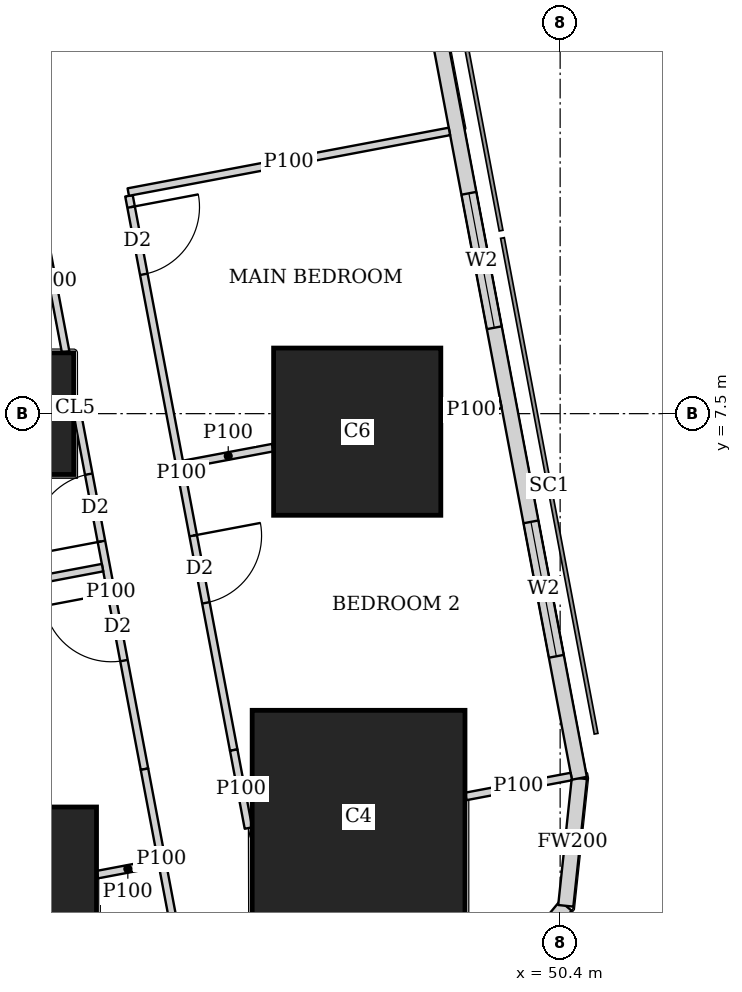
"""IFC4 building model, lengths in metres.
Left out: names, types, materials, properties, quantities, classifications, styles, units other than length and angle.
Written with IfcOpenShell. Run it as: python <this file> out.ifc"""

import sys

from ifc_helpers import new_model, si_unit, direction, frame, frame_2d, origin, origin_2d, place, context, subcontext, project, spatial, rectangle, extrude, element, fill, save


model = new_model("IFC4")
c1 = context("Model", 3, precision=1e-05, world=origin(), true_north=direction((0.0, 1.0)))
c2 = subcontext(c1, "Body", "Model", "MODEL_VIEW")
j1 = project(units=[si_unit("LENGTHUNIT", "METRE"), si_unit("PLANEANGLEUNIT", "RADIAN")], contexts=[c1])
p1 = place(None, origin())
s1 = spatial("IfcSite", under=j1, at=p1, CompositionType="ELEMENT")
p2 = place(p1, origin())
s2 = spatial("IfcBuilding", under=s1, at=p2, CompositionType="ELEMENT")
p3 = place(p2, frame((0.0, 0.0, 77.9)))
s3 = spatial("IfcBuildingStorey", under=s2, at=p3, CompositionType="ELEMENT", Elevation=77.9)
p4 = place(p3, frame((43.2, 1.225, 0.0), z_axis=(0.0, 0.0, 1.0), x_axis=(1.0, 0.0, 0.0)))
e1 = element("IfcColumn", 1, at=p4, inside=s3, PredefinedType="COLUMN", context=c2, shape_type="SweptSolid", body=[
    extrude(rectangle(XDim=2.2, YDim=2.2, at=origin_2d()), origin(), (0.0, 0.0, 1.0), 3.75),
])
p5 = place(p3, frame((47.748, 2.197, 0.0), z_axis=(0.0, 0.0, 1.0), x_axis=(1.0, 0.0, 0.0)))
e2 = element("IfcColumn", 2, at=p5, inside=s3, PredefinedType="COLUMN", context=c2, shape_type="SweptSolid", body=[
    extrude(rectangle(XDim=2.8, YDim=2.8, at=origin_2d()), origin(), (0.0, 0.0, 1.0), 3.75),
])
p6 = place(p3, frame((43.2, 7.5, 0.0), z_axis=(0.0, 0.0, 1.0), x_axis=(1.0, 0.0, 0.0)))
e3 = element("IfcColumn", 3, at=p6, inside=s3, PredefinedType="COLUMN", context=c2, shape_type="SweptSolid", body=[
    extrude(rectangle(XDim=1.6, YDim=1.6, at=origin_2d()), origin(), (0.0, 0.0, 1.0), 3.75),
])
p7 = place(p3, frame((47.73, 7.263, 0.0), z_axis=(0.0, 0.0, 1.0), x_axis=(1.0, 0.0, 0.0)))
e4 = element("IfcColumn", 4, at=p7, inside=s3, PredefinedType="COLUMN", context=c2, shape_type="SweptSolid", body=[
    extrude(rectangle(XDim=2.2, YDim=2.2, at=origin_2d()), origin(), (0.0, 0.0, 1.0), 3.75),
])
p8 = place(p3, frame((49.407, -0.263, 0.0), z_axis=(0.0, 0.0, 1.0), x_axis=(0.638042593423, 0.770001070764, 0.0)))
e5 = element("IfcWall", 5, at=p8, inside=s3, PredefinedType="SOLIDWALL", context=c2, shape_type="SweptSolid", body=[
    extrude(rectangle(XDim=1.673, YDim=0.2, at=frame_2d((0.836, 0.0))), origin(), (0.0, 0.0, 1.0), 3.5),
])
p9 = place(p3, frame((50.474, 1.025, 0.0), z_axis=(0.0, 0.0, 1.0), x_axis=(0.106047815515, 0.994361031429, 0.0)))
e6 = element("IfcWall", 6, at=p9, inside=s3, PredefinedType="SOLIDWALL", context=c2, shape_type="SweptSolid", body=[
    extrude(rectangle(XDim=1.688, YDim=0.2, at=frame_2d((0.844, 0.0))), origin(), (0.0, 0.0, 1.0), 3.5),
])
p10 = place(p3, frame((50.653, 2.703, 0.0), z_axis=(0.0, 0.0, 1.0), x_axis=(-0.185612026696, 0.982623109613, 0.0)))
e7 = element("IfcWall", 7, at=p10, inside=s3, PredefinedType="SOLIDWALL", context=c2, shape_type="SweptSolid", body=[
    extrude(rectangle(XDim=41.393, YDim=0.2, at=frame_2d((20.697, 0.0))), origin(), (0.0, 0.0, 1.0), 3.5),
])
p11 = place(p10, frame((1.633, 0.0, 0.9)))
e8 = element("IfcOpeningElement", 8, at=p11, cuts=e7, PredefinedType="OPENING", context=c2, shape_type="SweptSolid", body=[
    extrude(rectangle(XDim=1.8, YDim=1.5, at=frame_2d((0.9, 0.75))), frame((0.0, 0.11, 0.0), z_axis=(0.0, -1.0, 0.0), x_axis=(1.0, 0.0, 0.0)), (0.0, 0.0, 1.0), 0.22),
])
p12 = place(p10, frame((6.032, 0.0, 0.9)))
e9 = element("IfcOpeningElement", 9, at=p12, cuts=e7, PredefinedType="OPENING", context=c2, shape_type="SweptSolid", body=[
    extrude(rectangle(XDim=1.8, YDim=1.5, at=frame_2d((0.9, 0.75))), frame((0.0, 0.11, 0.0), z_axis=(0.0, -1.0, 0.0), x_axis=(1.0, 0.0, 0.0)), (0.0, 0.0, 1.0), 0.22),
])
p13 = place(p10, frame((9.848, 0.0, 0.9)))
e10 = element("IfcOpeningElement", 10, at=p13, cuts=e7, PredefinedType="OPENING", context=c2, shape_type="SweptSolid", body=[
    extrude(rectangle(XDim=1.8, YDim=1.5, at=frame_2d((0.9, 0.75))), frame((0.0, 0.11, 0.0), z_axis=(0.0, -1.0, 0.0), x_axis=(1.0, 0.0, 0.0)), (0.0, 0.0, 1.0), 0.22),
])
p14 = place(p10, frame((13.664, 0.0, 0.9)))
e11 = element("IfcOpeningElement", 11, at=p14, cuts=e7, PredefinedType="OPENING", context=c2, shape_type="SweptSolid", body=[
    extrude(rectangle(XDim=1.8, YDim=1.5, at=frame_2d((0.9, 0.75))), frame((0.0, 0.11, 0.0), z_axis=(0.0, -1.0, 0.0), x_axis=(1.0, 0.0, 0.0)), (0.0, 0.0, 1.0), 0.22),
])
p15 = place(p10, frame((17.481, 0.0, 0.9)))
e12 = element("IfcOpeningElement", 12, at=p15, cuts=e7, PredefinedType="OPENING", context=c2, shape_type="SweptSolid", body=[
    extrude(rectangle(XDim=1.8, YDim=1.5, at=frame_2d((0.9, 0.75))), frame((0.0, 0.11, 0.0), z_axis=(0.0, -1.0, 0.0), x_axis=(1.0, 0.0, 0.0)), (0.0, 0.0, 1.0), 0.22),
])
p16 = place(p10, frame((21.297, 0.0, 0.9)))
e13 = element("IfcOpeningElement", 13, at=p16, cuts=e7, PredefinedType="OPENING", context=c2, shape_type="SweptSolid", body=[
    extrude(rectangle(XDim=1.8, YDim=1.5, at=frame_2d((0.9, 0.75))), frame((0.0, 0.11, 0.0), z_axis=(0.0, -1.0, 0.0), x_axis=(1.0, 0.0, 0.0)), (0.0, 0.0, 1.0), 0.22),
])
p17 = place(p10, frame((25.113, 0.0, 0.9)))
e14 = element("IfcOpeningElement", 14, at=p17, cuts=e7, PredefinedType="OPENING", context=c2, shape_type="SweptSolid", body=[
    extrude(rectangle(XDim=1.8, YDim=1.5, at=frame_2d((0.9, 0.75))), frame((0.0, 0.11, 0.0), z_axis=(0.0, -1.0, 0.0), x_axis=(1.0, 0.0, 0.0)), (0.0, 0.0, 1.0), 0.22),
])
p18 = place(p10, frame((28.93, 0.0, 0.9)))
e15 = element("IfcOpeningElement", 15, at=p18, cuts=e7, PredefinedType="OPENING", context=c2, shape_type="SweptSolid", body=[
    extrude(rectangle(XDim=1.8, YDim=1.5, at=frame_2d((0.9, 0.75))), frame((0.0, 0.11, 0.0), z_axis=(0.0, -1.0, 0.0), x_axis=(1.0, 0.0, 0.0)), (0.0, 0.0, 1.0), 0.22),
])
p19 = place(p10, frame((32.746, 0.0, 0.9)))
e16 = element("IfcOpeningElement", 16, at=p19, cuts=e7, PredefinedType="OPENING", context=c2, shape_type="SweptSolid", body=[
    extrude(rectangle(XDim=1.8, YDim=1.5, at=frame_2d((0.9, 0.75))), frame((0.0, 0.11, 0.0), z_axis=(0.0, -1.0, 0.0), x_axis=(1.0, 0.0, 0.0)), (0.0, 0.0, 1.0), 0.22),
])
p20 = place(p10, frame((36.481, 0.0, 0.9)))
e17 = element("IfcOpeningElement", 17, at=p20, cuts=e7, PredefinedType="OPENING", context=c2, shape_type="SweptSolid", body=[
    extrude(rectangle(XDim=1.8, YDim=1.5, at=frame_2d((0.9, 0.75))), frame((0.0, 0.11, 0.0), z_axis=(0.0, -1.0, 0.0), x_axis=(1.0, 0.0, 0.0)), (0.0, 0.0, 1.0), 0.22),
])
p21 = place(p3, frame((44.727, 10.366, 0.0), z_axis=(0.0, 0.0, 1.0), x_axis=(0.185678775129, -0.982610498858, 0.0)))
e18 = element("IfcWall", 18, at=p21, inside=s3, PredefinedType="PARTITIONING", context=c2, shape_type="SweptSolid", body=[
    extrude(rectangle(XDim=7.421, YDim=0.1, at=frame_2d((3.71, 0.0))), origin(), (0.0, 0.0, 1.0), 3.5),
])
p22 = place(p21, frame((0.151, 0.0, 0.0)))
e19 = element("IfcOpeningElement", 19, at=p22, cuts=e18, PredefinedType="OPENING", context=c2, shape_type="SweptSolid", body=[
    extrude(rectangle(XDim=0.9, YDim=2.1, at=frame_2d((0.45, 1.05))), frame((0.0, 0.06, 0.0), z_axis=(0.0, -1.0, 0.0), x_axis=(1.0, 0.0, 0.0)), (0.0, 0.0, 1.0), 0.12),
])
p23 = place(p21, frame((4.55, 0.0, 0.0)))
e20 = element("IfcOpeningElement", 20, at=p23, cuts=e18, PredefinedType="OPENING", context=c2, shape_type="SweptSolid", body=[
    extrude(rectangle(XDim=0.9, YDim=2.1, at=frame_2d((0.45, 1.05))), frame((0.0, 0.06, 0.0), z_axis=(0.0, -1.0, 0.0), x_axis=(1.0, 0.0, 0.0)), (0.0, 0.0, 1.0), 0.12),
])
p24 = place(p3, frame((46.105, 3.074, 0.0), z_axis=(0.0, 0.0, 1.0), x_axis=(0.185897769544, -0.982569091351, 0.0)))
e21 = element("IfcWall", 21, at=p24, inside=s3, PredefinedType="PARTITIONING", context=c2, shape_type="SweptSolid", body=[
    extrude(rectangle(XDim=1.044, YDim=0.1, at=frame_2d((0.522, 0.0))), origin(), (0.0, 0.0, 1.0), 2.05),
])
p25 = place(p3, frame((43.539, 10.192, 0.0), z_axis=(0.0, 0.0, 1.0), x_axis=(0.185366049966, -0.982669541362, 0.0)))
e22 = element("IfcWall", 22, at=p25, inside=s3, PredefinedType="PARTITIONING", context=c2, shape_type="SweptSolid", body=[
    extrude(rectangle(XDim=1.915, YDim=0.1, at=frame_2d((0.958, 0.0))), origin(), (0.0, 0.0, 1.0), 3.5),
])
p26 = place(p3, frame((44.049, 7.49, 0.0), z_axis=(0.0, 0.0, 1.0), x_axis=(0.185666332607, -0.982612849975, 0.0)))
e23 = element("IfcWall", 23, at=p26, inside=s3, PredefinedType="PARTITIONING", context=c2, shape_type="SweptSolid", body=[
    extrude(rectangle(XDim=4.75, YDim=0.1, at=frame_2d((2.375, 0.0))), origin(), (0.0, 0.0, 1.0), 3.5),
])
p27 = place(p26, frame((0.8, 0.0, 0.0)))
e24 = element("IfcOpeningElement", 24, at=p27, cuts=e23, PredefinedType="OPENING", context=c2, shape_type="SweptSolid", body=[
    extrude(rectangle(XDim=0.9, YDim=2.1, at=frame_2d((0.45, 1.05))), frame((0.0, 0.06, 0.0), z_axis=(0.0, -1.0, 0.0), x_axis=(1.0, 0.0, 0.0)), (0.0, 0.0, 1.0), 0.12),
])
p28 = place(p26, frame((2.396, 0.0, 0.0)))
e25 = element("IfcOpeningElement", 25, at=p28, cuts=e23, PredefinedType="OPENING", context=c2, shape_type="SweptSolid", body=[
    extrude(rectangle(XDim=0.9, YDim=2.1, at=frame_2d((0.45, 1.05))), frame((0.0, 0.06, 0.0), z_axis=(0.0, -1.0, 0.0), x_axis=(1.0, 0.0, 0.0)), (0.0, 0.0, 1.0), 0.12),
])
p29 = place(p3, frame((44.931, 2.823, 0.0), z_axis=(0.0, 0.0, 1.0), x_axis=(0.185631845838, -0.982619365681, 0.0)))
e26 = element("IfcWall", 26, at=p29, inside=s3, PredefinedType="PARTITIONING", context=c2, shape_type="SweptSolid", body=[
    extrude(rectangle(XDim=2.403, YDim=0.1, at=frame_2d((1.201, 0.0))), origin(), (0.0, 0.0, 1.0), 2.05),
])
p30 = place(p3, frame((48.943, 11.213, 0.0), z_axis=(0.0, 0.0, 1.0), x_axis=(-0.982633535512, -0.185556823879, 0.0)))
e27 = element("IfcWall", 27, at=p30, inside=s3, PredefinedType="PARTITIONING", context=c2, shape_type="SweptSolid", body=[
    extrude(rectangle(XDim=4.3, YDim=0.1, at=frame_2d((2.15, 0.0))), origin(), (0.0, 0.0, 1.0), 2.2),
])
p31 = place(p3, frame((49.622, 7.62, 0.0), z_axis=(0.0, 0.0, 1.0), x_axis=(-0.982512656401, -0.186195810938, 0.0)))
e28 = element("IfcWall", 28, at=p31, inside=s3, PredefinedType="PARTITIONING", context=c2, shape_type="SweptSolid", body=[
    extrude(rectangle(XDim=0.796, YDim=0.1, at=frame_2d((0.398, 0.0))), origin(), (0.0, 0.0, 1.0), 2.05),
])
p32 = place(p3, frame((46.62, 7.053, 0.0), z_axis=(0.0, 0.0, 1.0), x_axis=(-0.982749355621, -0.18494243436, 0.0)))
e29 = element("IfcWall", 29, at=p32, inside=s3, PredefinedType="PARTITIONING", context=c2, shape_type="SweptSolid", body=[
    extrude(rectangle(XDim=1.195, YDim=0.1, at=frame_2d((0.597, 0.0))), origin(), (0.0, 0.0, 1.0), 2.05),
])
p33 = place(p3, frame((50.547, 2.726, 0.0), z_axis=(0.0, 0.0, 1.0), x_axis=(-0.982680053146, -0.185310315822, 0.0)))
e30 = element("IfcWall", 30, at=p33, inside=s3, PredefinedType="PARTITIONING", context=c2, shape_type="SweptSolid", body=[
    extrude(rectangle(XDim=1.414, YDim=0.1, at=frame_2d((0.707, 0.0))), origin(), (0.0, 0.0, 1.0), 3.5),
])
p34 = place(p3, frame((45.114, 1.587, 0.0), z_axis=(0.0, 0.0, 1.0), x_axis=(-0.982624706348, -0.185603573443, 0.0)))
e31 = element("IfcWall", 31, at=p34, inside=s3, PredefinedType="PARTITIONING", context=c2, shape_type="SweptSolid", body=[
    extrude(rectangle(XDim=0.818, YDim=0.1, at=frame_2d((0.409, 0.0))), origin(), (0.0, 0.0, 1.0), 2.05),
])
p35 = place(p3, frame((44.379, 5.474, 0.0), z_axis=(0.0, 0.0, 1.0), x_axis=(-0.982607026909, -0.185697147715, 0.0)))
e32 = element("IfcWall", 32, at=p35, inside=s3, PredefinedType="PARTITIONING", context=c2, shape_type="SweptSolid", body=[
    extrude(rectangle(XDim=3.275, YDim=0.1, at=frame_2d((1.637, 0.0))), origin(), (0.0, 0.0, 1.0), 3.5),
])
p36 = place(p11, origin())
e33 = element("IfcWindow", 33, at=p36, inside=s3, PartitioningType="SINGLE_PANEL", PredefinedType="WINDOW", context=c2, shape_type="SweptSolid", body=[
    extrude(rectangle(XDim=1.8, YDim=1.5, at=frame_2d((0.9, 0.75))), frame((0.0, 0.03, 0.0), z_axis=(0.0, -1.0, 0.0), x_axis=(1.0, 0.0, 0.0)), (0.0, 0.0, 1.0), 0.06),
])
fill(e8, e33)
p37 = place(p12, origin())
e34 = element("IfcWindow", 34, at=p37, inside=s3, PartitioningType="SINGLE_PANEL", PredefinedType="WINDOW", context=c2, shape_type="SweptSolid", body=[
    extrude(rectangle(XDim=1.8, YDim=1.5, at=frame_2d((0.9, 0.75))), frame((0.0, 0.03, 0.0), z_axis=(0.0, -1.0, 0.0), x_axis=(1.0, 0.0, 0.0)), (0.0, 0.0, 1.0), 0.06),
])
fill(e9, e34)
p38 = place(p22, origin())
e35 = element("IfcDoor", 35, at=p38, inside=s3, OperationType="SINGLE_SWING_LEFT", PredefinedType="DOOR", context=c2, shape_type="SweptSolid", body=[
    extrude(rectangle(XDim=0.9, YDim=2.1, at=frame_2d((0.45, 1.05))), frame((0.0, 0.025, 0.0), z_axis=(0.0, -1.0, 0.0), x_axis=(1.0, 0.0, 0.0)), (0.0, 0.0, 1.0), 0.05),
])
fill(e19, e35)
p39 = place(p23, origin())
e36 = element("IfcDoor", 36, at=p39, inside=s3, OperationType="SINGLE_SWING_LEFT", PredefinedType="DOOR", context=c2, shape_type="SweptSolid", body=[
    extrude(rectangle(XDim=0.9, YDim=2.1, at=frame_2d((0.45, 1.05))), frame((0.0, 0.025, 0.0), z_axis=(0.0, -1.0, 0.0), x_axis=(1.0, 0.0, 0.0)), (0.0, 0.0, 1.0), 0.05),
])
fill(e20, e36)
p40 = place(p27, origin())
e37 = element("IfcDoor", 37, at=p40, inside=s3, OperationType="SINGLE_SWING_LEFT", PredefinedType="DOOR", context=c2, shape_type="SweptSolid", body=[
    extrude(rectangle(XDim=0.9, YDim=2.1, at=frame_2d((0.45, 1.05))), frame((0.0, 0.025, 0.0), z_axis=(0.0, -1.0, 0.0), x_axis=(1.0, 0.0, 0.0)), (0.0, 0.0, 1.0), 0.05),
])
fill(e24, e37)
p41 = place(p28, origin())
e38 = element("IfcDoor", 38, at=p41, inside=s3, OperationType="SINGLE_SWING_RIGHT", PredefinedType="DOOR", context=c2, shape_type="SweptSolid", body=[
    extrude(rectangle(XDim=0.9, YDim=2.1, at=frame_2d((0.45, 1.05))), frame((0.0, 0.025, 0.0), z_axis=(0.0, -1.0, 0.0), x_axis=(1.0, 0.0, 0.0)), (0.0, 0.0, 1.0), 0.05),
])
fill(e25, e38)
save(model, sys.argv[1])
